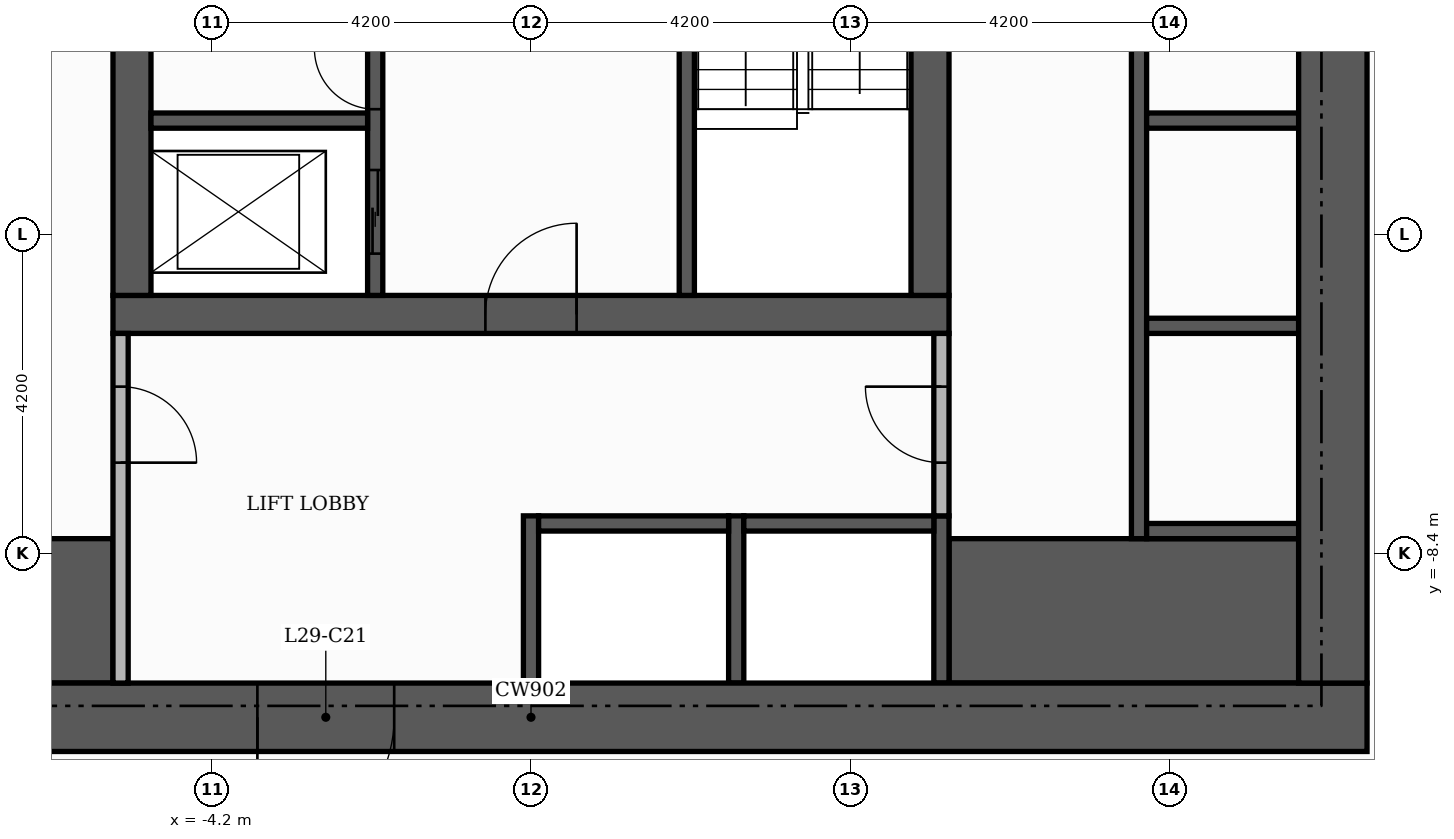
"""IFC4 building model, lengths in metres.
Left out: names, types, materials, properties, quantities, classifications, styles, units other than length and angle.
Written with IfcOpenShell. Run it as: python <this file> out.ifc"""

import sys

from ifc_helpers import new_model, si_unit, direction, frame, frame_2d, origin, place, context, subcontext, project, spatial, rectangle, extrude, element, fill, save


model = new_model("IFC4")
c1 = context("Model", 3, precision=1e-05, world=origin(), true_north=direction((0.0, 1.0)))
c2 = subcontext(c1, "Body", "Model", "MODEL_VIEW")
j1 = project(units=[si_unit("LENGTHUNIT", "METRE"), si_unit("PLANEANGLEUNIT", "RADIAN")], contexts=[c1])
p1 = place(None, origin())
s1 = spatial("IfcSite", under=j1, at=p1, CompositionType="ELEMENT")
p2 = place(p1, origin())
s2 = spatial("IfcBuilding", under=s1, at=p2, CompositionType="ELEMENT")
p3 = place(p2, frame((0.0, 0.0, 122.1)))
s3 = spatial("IfcBuildingStorey", under=s2, at=p3, CompositionType="ELEMENT", Elevation=122.1)
p4 = place(p3, frame((-5.5, -5.25, 0.0), z_axis=(0.0, 0.0, 1.0), x_axis=(1.0, 0.0, 0.0)))
e1 = element("IfcWall", 1, at=p4, inside=s3, PredefinedType="SHEAR", context=c2, shape_type="SweptSolid", body=[
    extrude(rectangle(XDim=11.0, YDim=0.5, at=frame_2d((5.5, 0.0))), origin(), (0.0, 0.0, 1.0), 3.4),
])
p5 = place(p4, frame((4.9, 0.0, 0.0)))
e2 = element("IfcOpeningElement", 2, at=p5, cuts=e1, PredefinedType="OPENING", context=c2, shape_type="SweptSolid", body=[
    extrude(rectangle(XDim=1.2, YDim=2.1, at=frame_2d((0.6, 1.05))), frame((0.0, 0.26, 0.0), z_axis=(0.0, -1.0, 0.0), x_axis=(1.0, 0.0, 0.0)), (0.0, 0.0, 1.0), 0.52),
])
for number, where, z_axis, x_axis in (
    (3, (-5.25, -5.0, 0.0), (0.0, 0.0, 1.0), (0.0, 1.0, 0.0)),
    (4, (5.25, -5.0, 0.0), (0.0, 0.0, 1.0), (0.0, 1.0, 0.0)),
):
    element("IfcWall", number, at=place(p3, frame(where, z_axis=z_axis, x_axis=x_axis)), inside=s3, PredefinedType="SHEAR", context=c2, shape_type="SweptSolid", body=[
        extrude(rectangle(XDim=10.5, YDim=0.5, at=frame_2d((5.25, 0.0))), origin(), (0.0, 0.0, 1.0), 3.4),
    ])
for number, where, z_axis, x_axis in (
    (5, (-10.1, -9.15, 0.0), (0.0, 0.0, 1.0), (1.0, 0.0, 0.0)),
    (6, (5.5, -9.15, 0.0), (0.0, 0.0, 1.0), (1.0, 0.0, 0.0)),
):
    element("IfcWall", number, at=place(p3, frame(where, z_axis=z_axis, x_axis=x_axis)), inside=s3, PredefinedType="SHEAR", context=c2, shape_type="SweptSolid", body=[
        extrude(rectangle(XDim=4.6, YDim=1.9, at=frame_2d((2.3, 0.0))), origin(), (0.0, 0.0, 1.0), 3.4),
    ])
p6 = place(p3, frame((2.05, -5.0, 0.0), z_axis=(0.0, 0.0, 1.0), x_axis=(0.0, 1.0, 0.0)))
e7 = element("IfcWall", 7, at=p6, inside=s3, PredefinedType="SHEAR", context=c2, shape_type="SweptSolid", body=[
    extrude(rectangle(XDim=6.6, YDim=0.2, at=frame_2d((3.3, 0.0))), origin(), (0.0, 0.0, 1.0), 3.4),
])
p7 = place(p6, frame((5.25, 0.0, 0.0)))
e8 = element("IfcOpeningElement", 8, at=p7, cuts=e7, PredefinedType="OPENING", context=c2, shape_type="SweptSolid", body=[
    extrude(rectangle(XDim=1.0, YDim=2.1, at=frame_2d((0.5, 1.05))), frame((0.0, 0.11, 0.0), z_axis=(0.0, -1.0, 0.0), x_axis=(1.0, 0.0, 0.0)), (0.0, 0.0, 1.0), 0.22),
])
for number, where, z_axis, x_axis in (
    (9, (0.0, -10.1, 0.0), (0.0, 0.0, 1.0), (0.0, 1.0, 0.0)),
    (10, (2.7, -10.1, 0.0), (0.0, 0.0, 1.0), (0.0, 1.0, 0.0)),
    (11, (5.4, -10.1, 0.0), (0.0, 0.0, 1.0), (0.0, 1.0, 0.0)),
):
    element("IfcWall", number, at=place(p3, frame(where, z_axis=z_axis, x_axis=x_axis)), inside=s3, PredefinedType="SHEAR", context=c2, shape_type="SweptSolid", body=[
        extrude(rectangle(XDim=2.2, YDim=0.2, at=frame_2d((1.1, 0.0))), origin(), (0.0, 0.0, 1.0), 3.4),
    ])
p8 = place(p3, frame((8.0, -8.2, 0.0), z_axis=(0.0, 0.0, 1.0), x_axis=(0.0, 1.0, 0.0)))
e12 = element("IfcWall", 12, at=p8, inside=s3, PredefinedType="SHEAR", context=c2, shape_type="SweptSolid", body=[
    extrude(rectangle(XDim=16.4, YDim=0.2, at=frame_2d((8.2, 0.0))), origin(), (0.0, 0.0, 1.0), 3.4),
])
p9 = place(p3, frame((8.1, -8.1, 0.0), z_axis=(0.0, 0.0, 1.0), x_axis=(1.0, 0.0, 0.0)))
e13 = element("IfcWall", 13, at=p9, inside=s3, PredefinedType="SHEAR", context=c2, shape_type="SweptSolid", body=[
    extrude(rectangle(XDim=2.0, YDim=0.2, at=frame_2d((1.0, 0.0))), origin(), (0.0, 0.0, 1.0), 3.4),
])
for number, where, z_axis, x_axis in (
    (14, (0.1, -8.0, 0.0), (0.0, 0.0, 1.0), (1.0, 0.0, 0.0)),
    (15, (2.8, -8.0, 0.0), (0.0, 0.0, 1.0), (1.0, 0.0, 0.0)),
):
    element("IfcWall", number, at=place(p3, frame(where, z_axis=z_axis, x_axis=x_axis)), inside=s3, PredefinedType="SHEAR", context=c2, shape_type="SweptSolid", body=[
        extrude(rectangle(XDim=2.5, YDim=0.2, at=frame_2d((1.25, 0.0))), origin(), (0.0, 0.0, 1.0), 3.4),
    ])
p10 = place(p3, frame((8.1, -5.4, 0.0), z_axis=(0.0, 0.0, 1.0), x_axis=(1.0, 0.0, 0.0)))
e16 = element("IfcWall", 16, at=p10, inside=s3, PredefinedType="SHEAR", context=c2, shape_type="SweptSolid", body=[
    extrude(rectangle(XDim=2.0, YDim=0.2, at=frame_2d((1.0, 0.0))), origin(), (0.0, 0.0, 1.0), 3.4),
])
p11 = place(p3, frame((-2.05, -5.0, 0.0), z_axis=(0.0, 0.0, 1.0), x_axis=(0.0, 1.0, 0.0)))
e17 = element("IfcWall", 17, at=p11, inside=s3, PredefinedType="SHEAR", context=c2, shape_type="SweptSolid", body=[
    extrude(rectangle(XDim=3.4, YDim=0.2, at=frame_2d((1.7, 0.0))), origin(), (0.0, 0.0, 1.0), 3.4),
])
p12 = place(p11, frame((0.55, 0.0, 0.0)))
e18 = element("IfcOpeningElement", 18, at=p12, cuts=e17, PredefinedType="OPENING", context=c2, shape_type="SweptSolid", body=[
    extrude(rectangle(XDim=1.1, YDim=2.1, at=frame_2d((0.55, 1.05))), frame((0.0, 0.11, 0.0), z_axis=(0.0, -1.0, 0.0), x_axis=(1.0, 0.0, 0.0)), (0.0, 0.0, 1.0), 0.22),
])
p13 = place(p11, frame((2.45, 0.0, 0.0)))
e19 = element("IfcOpeningElement", 19, at=p13, cuts=e17, PredefinedType="OPENING", context=c2, shape_type="SweptSolid", body=[
    extrude(rectangle(XDim=0.8, YDim=2.1, at=frame_2d((0.4, 1.05))), frame((0.0, 0.11, 0.0), z_axis=(0.0, -1.0, 0.0), x_axis=(1.0, 0.0, 0.0)), (0.0, 0.0, 1.0), 0.22),
])
p14 = place(p3, frame((-5.0, -2.7, 0.0), z_axis=(0.0, 0.0, 1.0), x_axis=(1.0, 0.0, 0.0)))
e20 = element("IfcWall", 20, at=p14, inside=s3, PredefinedType="SHEAR", context=c2, shape_type="SweptSolid", body=[
    extrude(rectangle(XDim=2.85, YDim=0.2, at=frame_2d((1.425, 0.0))), origin(), (0.0, 0.0, 1.0), 3.4),
])
p15 = place(p3, frame((8.1, -2.7, 0.0), z_axis=(0.0, 0.0, 1.0), x_axis=(1.0, 0.0, 0.0)))
e21 = element("IfcWall", 21, at=p15, inside=s3, PredefinedType="SHEAR", context=c2, shape_type="SweptSolid", body=[
    extrude(rectangle(XDim=2.0, YDim=0.2, at=frame_2d((1.0, 0.0))), origin(), (0.0, 0.0, 1.0), 3.4),
])
p16 = place(p3, frame((-11.0, -10.55, 0.0), z_axis=(0.0, 0.0, 1.0), x_axis=(1.0, 0.0, 0.0)))
e22 = element("IfcWall", 22, at=p16, inside=s3, PredefinedType="SHEAR", context=c2, shape_type="SweptSolid", body=[
    extrude(rectangle(XDim=22.0, YDim=0.9, at=frame_2d((11.0, 0.0))), origin(), (0.0, 0.0, 1.0), 3.4),
])
p17 = place(p16, frame((7.4, 0.0, 0.0)))
e23 = element("IfcOpeningElement", 23, at=p17, cuts=e22, PredefinedType="OPENING", context=c2, shape_type="SweptSolid", body=[
    extrude(rectangle(XDim=1.8, YDim=2.2, at=frame_2d((0.9, 1.1))), frame((0.0, 0.46, 0.0), z_axis=(0.0, -1.0, 0.0), x_axis=(1.0, 0.0, 0.0)), (0.0, 0.0, 1.0), 0.92),
])
p18 = place(p3, frame((10.55, -10.1, 0.0), z_axis=(0.0, 0.0, 1.0), x_axis=(0.0, 1.0, 0.0)))
e24 = element("IfcWall", 24, at=p18, inside=s3, PredefinedType="SHEAR", context=c2, shape_type="SweptSolid", body=[
    extrude(rectangle(XDim=20.2, YDim=0.9, at=frame_2d((10.1, 0.0))), origin(), (0.0, 0.0, 1.0), 3.4),
])
p19 = place(p3, frame((-5.4, -10.1, 0.0), z_axis=(0.0, 0.0, 1.0), x_axis=(0.0, 1.0, 0.0)))
e25 = element("IfcWall", 25, at=p19, inside=s3, PredefinedType="PARTITIONING", context=c2, shape_type="SweptSolid", body=[
    extrude(rectangle(XDim=4.6, YDim=0.2, at=frame_2d((2.3, 0.0))), origin(), (0.0, 0.0, 1.0), 3.4),
])
p20 = place(p19, frame((2.9, 0.0, 0.0)))
e26 = element("IfcOpeningElement", 26, at=p20, cuts=e25, PredefinedType="OPENING", context=c2, shape_type="SweptSolid", body=[
    extrude(rectangle(XDim=1.0, YDim=2.1, at=frame_2d((0.5, 1.05))), frame((0.0, 0.11, 0.0), z_axis=(0.0, -1.0, 0.0), x_axis=(1.0, 0.0, 0.0)), (0.0, 0.0, 1.0), 0.22),
])
p21 = place(p3, frame((5.4, -7.9, 0.0), z_axis=(0.0, 0.0, 1.0), x_axis=(0.0, 1.0, 0.0)))
e27 = element("IfcWall", 27, at=p21, inside=s3, PredefinedType="PARTITIONING", context=c2, shape_type="SweptSolid", body=[
    extrude(rectangle(XDim=2.4, YDim=0.2, at=frame_2d((1.2, 0.0))), origin(), (0.0, 0.0, 1.0), 3.4),
])
p22 = place(p21, frame((0.7, 0.0, 0.0)))
e28 = element("IfcOpeningElement", 28, at=p22, cuts=e27, PredefinedType="OPENING", context=c2, shape_type="SweptSolid", body=[
    extrude(rectangle(XDim=1.0, YDim=2.1, at=frame_2d((0.5, 1.05))), frame((0.0, 0.11, 0.0), z_axis=(0.0, -1.0, 0.0), x_axis=(1.0, 0.0, 0.0)), (0.0, 0.0, 1.0), 0.22),
])
p23 = place(p12, origin())
e29 = element("IfcDoor", 29, at=p23, inside=s3, OperationType="SLIDING_TO_LEFT", PredefinedType="DOOR", context=c2, shape_type="SweptSolid", body=[
    extrude(rectangle(XDim=1.1, YDim=2.1, at=frame_2d((0.55, 1.05))), frame((0.0, 0.025, 0.0), z_axis=(0.0, -1.0, 0.0), x_axis=(1.0, 0.0, 0.0)), (0.0, 0.0, 1.0), 0.05),
])
fill(e18, e29)
p24 = place(p13, origin())
e30 = element("IfcDoor", 30, at=p24, inside=s3, OperationType="SINGLE_SWING_RIGHT", PredefinedType="DOOR", context=c2, shape_type="SweptSolid", body=[
    extrude(rectangle(XDim=0.8, YDim=2.1, at=frame_2d((0.4, 1.05))), frame((0.0, 0.025, 0.0), z_axis=(0.0, -1.0, 0.0), x_axis=(1.0, 0.0, 0.0)), (0.0, 0.0, 1.0), 0.05),
])
fill(e19, e30)
p25 = place(p5, origin())
e31 = element("IfcDoor", 31, at=p25, inside=s3, OperationType="SINGLE_SWING_RIGHT", PredefinedType="DOOR", context=c2, shape_type="SweptSolid", body=[
    extrude(rectangle(XDim=1.2, YDim=2.1, at=frame_2d((0.6, 1.05))), frame((0.0, 0.025, 0.0), z_axis=(0.0, -1.0, 0.0), x_axis=(1.0, 0.0, 0.0)), (0.0, 0.0, 1.0), 0.05),
])
fill(e2, e31)
p26 = place(p20, frame((1.0, 0.0, 0.0), z_axis=(0.0, 0.0, 1.0), x_axis=(-1.0, 0.0, 0.0)))
e32 = element("IfcDoor", 32, at=p26, inside=s3, OperationType="SINGLE_SWING_LEFT", PredefinedType="DOOR", context=c2, shape_type="SweptSolid", body=[
    extrude(rectangle(XDim=1.0, YDim=2.1, at=frame_2d((0.5, 1.05))), frame((0.0, 0.025, 0.0), z_axis=(0.0, -1.0, 0.0), x_axis=(1.0, 0.0, 0.0)), (0.0, 0.0, 1.0), 0.05),
])
fill(e26, e32)
p27 = place(p22, origin())
e33 = element("IfcDoor", 33, at=p27, inside=s3, OperationType="SINGLE_SWING_RIGHT", PredefinedType="DOOR", context=c2, shape_type="SweptSolid", body=[
    extrude(rectangle(XDim=1.0, YDim=2.1, at=frame_2d((0.5, 1.05))), frame((0.0, 0.025, 0.0), z_axis=(0.0, -1.0, 0.0), x_axis=(1.0, 0.0, 0.0)), (0.0, 0.0, 1.0), 0.05),
])
fill(e28, e33)
p28 = place(p17, frame((1.8, 0.0, 0.0), z_axis=(0.0, 0.0, 1.0), x_axis=(-1.0, 0.0, 0.0)))
e34 = element("IfcDoor", 34, at=p28, inside=s3, OperationType="DOUBLE_DOOR_SINGLE_SWING", PredefinedType="DOOR", context=c2, shape_type="SweptSolid", body=[
    extrude(rectangle(XDim=1.8, YDim=2.2, at=frame_2d((0.9, 1.1))), frame((0.0, 0.025, 0.0), z_axis=(0.0, -1.0, 0.0), x_axis=(1.0, 0.0, 0.0)), (0.0, 0.0, 1.0), 0.05),
])
fill(e23, e34)
save(model, sys.argv[1])
